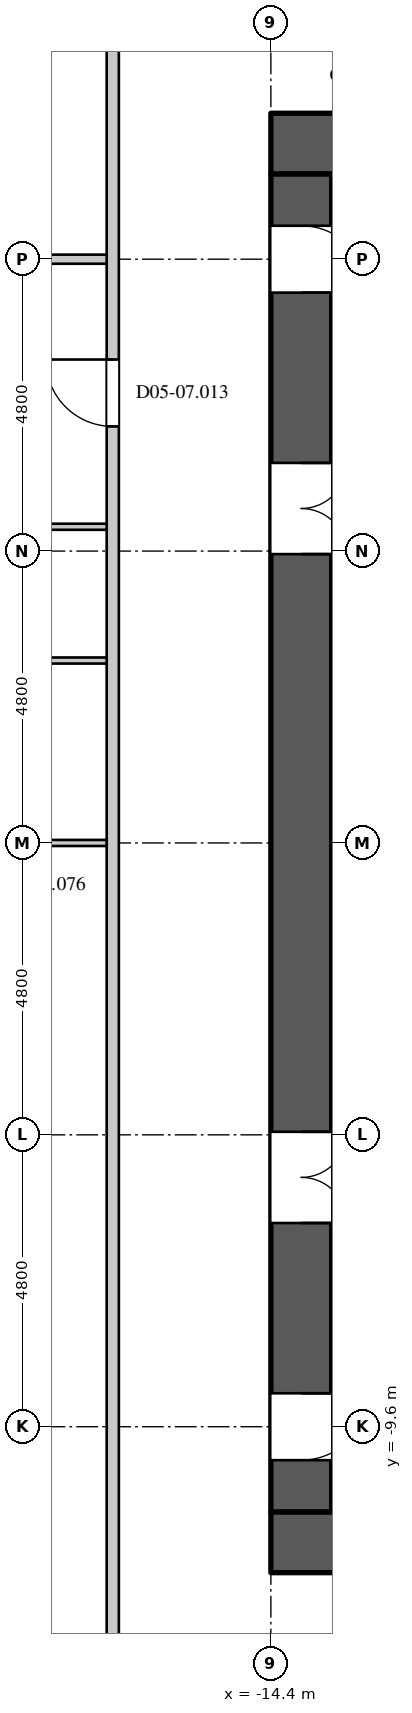
"""IFC4 building model, lengths in metres.
Left out: names, types, materials, properties, quantities, classifications, styles, units other than length and angle.
Written with IfcOpenShell. Run it as: python <this file> out.ifc"""

import sys

from ifc_helpers import new_model, si_unit, direction, frame, frame_2d, origin, place, context, subcontext, project, spatial, rectangle, extrude, element, fill, save


model = new_model("IFC4")
c1 = context("Model", 3, precision=1e-05, world=origin(), true_north=direction((0.0, 1.0)))
c2 = subcontext(c1, "Body", "Model", "MODEL_VIEW")
j1 = project(units=[si_unit("LENGTHUNIT", "METRE"), si_unit("PLANEANGLEUNIT", "RADIAN")], contexts=[c1])
p1 = place(None, origin())
s1 = spatial("IfcSite", under=j1, at=p1, CompositionType="ELEMENT")
p2 = place(p1, origin())
s2 = spatial("IfcBuilding", under=s1, at=p2, CompositionType="ELEMENT")
p3 = place(p2, frame((0.0, 0.0, 25.5)))
s3 = spatial("IfcBuildingStorey", under=s2, at=p3, CompositionType="ELEMENT", Elevation=25.5)
for number, where, z_axis, x_axis in (
    (1, (-14.4, 11.5, 0.0), (0.0, 0.0, 1.0), (1.0, 0.0, 0.0)),
    (2, (-14.4, -11.5, 0.0), (0.0, 0.0, 1.0), (1.0, 0.0, 0.0)),
):
    element("IfcWall", number, at=place(p3, frame(where, z_axis=z_axis, x_axis=x_axis)), inside=s3, PredefinedType="SHEAR", context=c2, shape_type="SweptSolid", body=[
        extrude(rectangle(XDim=28.8, YDim=1.0, at=frame_2d((14.4, 0.0))), origin(), (0.0, 0.0, 1.0), 4.2),
    ])
p4 = place(p3, frame((-13.9, -11.0, 0.0), z_axis=(0.0, 0.0, 1.0), x_axis=(0.0, 1.0, 0.0)))
e3 = element("IfcWall", 3, at=p4, inside=s3, PredefinedType="SHEAR", context=c2, shape_type="SweptSolid", body=[
    extrude(rectangle(XDim=22.0, YDim=1.0, at=frame_2d((11.0, 0.0))), origin(), (0.0, 0.0, 1.0), 4.2),
])
p5 = place(p4, frame((20.05, 0.0, 0.0)))
e4 = element("IfcOpeningElement", 4, at=p5, cuts=e3, PredefinedType="OPENING", context=c2, shape_type="SweptSolid", body=[
    extrude(rectangle(XDim=1.1, YDim=2.2, at=frame_2d((0.55, 1.1))), frame((0.0, 0.51, 0.0), z_axis=(0.0, -1.0, 0.0), x_axis=(1.0, 0.0, 0.0)), (0.0, 0.0, 1.0), 1.02),
])
p6 = place(p4, frame((0.85, 0.0, 0.0)))
e5 = element("IfcOpeningElement", 5, at=p6, cuts=e3, PredefinedType="OPENING", context=c2, shape_type="SweptSolid", body=[
    extrude(rectangle(XDim=1.1, YDim=2.2, at=frame_2d((0.55, 1.1))), frame((0.0, 0.51, 0.0), z_axis=(0.0, -1.0, 0.0), x_axis=(1.0, 0.0, 0.0)), (0.0, 0.0, 1.0), 1.02),
])
p7 = place(p4, frame((15.75, 0.0, 0.0)))
e6 = element("IfcOpeningElement", 6, at=p7, cuts=e3, PredefinedType="OPENING", context=c2, shape_type="SweptSolid", body=[
    extrude(rectangle(XDim=1.5, YDim=2.4, at=frame_2d((0.75, 1.2))), frame((0.0, 0.51, 0.0), z_axis=(0.0, -1.0, 0.0), x_axis=(1.0, 0.0, 0.0)), (0.0, 0.0, 1.0), 1.02),
])
p8 = place(p4, frame((4.75, 0.0, 0.0)))
e7 = element("IfcOpeningElement", 7, at=p8, cuts=e3, PredefinedType="OPENING", context=c2, shape_type="SweptSolid", body=[
    extrude(rectangle(XDim=1.5, YDim=2.4, at=frame_2d((0.75, 1.2))), frame((0.0, 0.51, 0.0), z_axis=(0.0, -1.0, 0.0), x_axis=(1.0, 0.0, 0.0)), (0.0, 0.0, 1.0), 1.02),
])
p9 = place(p3, frame((-17.0, -14.5, 0.0), z_axis=(0.0, 0.0, 1.0), x_axis=(0.0, 1.0, 0.0)))
e8 = element("IfcWall", 8, at=p9, inside=s3, PredefinedType="PARTITIONING", context=c2, shape_type="SweptSolid", body=[
    extrude(rectangle(XDim=29.0, YDim=0.2, at=frame_2d((14.5, 0.0))), origin(), (0.0, 0.0, 1.0), 3.95),
])
p10 = place(p9, frame((21.35, 0.0, 0.0)))
e9 = element("IfcOpeningElement", 9, at=p10, cuts=e8, PredefinedType="OPENING", context=c2, shape_type="SweptSolid", body=[
    extrude(rectangle(XDim=1.1, YDim=2.4, at=frame_2d((0.55, 1.2))), frame((0.0, 0.11, 0.0), z_axis=(0.0, -1.0, 0.0), x_axis=(1.0, 0.0, 0.0)), (0.0, 0.0, 1.0), 0.22),
])
p11 = place(p3, frame((-28.855, 9.6, 0.0), z_axis=(0.0, 0.0, 1.0), x_axis=(1.0, 0.0, 0.0)))
e10 = element("IfcWall", 10, at=p11, inside=s3, PredefinedType="PARTITIONING", context=c2, shape_type="SweptSolid", body=[
    extrude(rectangle(XDim=11.755, YDim=0.15, at=frame_2d((5.877, 0.0))), origin(), (0.0, 0.0, 1.0), 3.95),
])
p12 = place(p11, frame((8.95, 0.0, 0.0)))
e11 = element("IfcOpeningElement", 11, at=p12, cuts=e10, PredefinedType="OPENING", context=c2, shape_type="SweptSolid", body=[
    extrude(rectangle(XDim=0.95, YDim=2.2, at=frame_2d((0.475, 1.1))), frame((0.0, 0.085, 0.0), z_axis=(0.0, -1.0, 0.0), x_axis=(1.0, 0.0, 0.0)), (0.0, 0.0, 1.0), 0.17),
])
p13 = place(p11, frame((2.2, 0.0, 0.0)))
e12 = element("IfcOpeningElement", 12, at=p13, cuts=e10, PredefinedType="OPENING", context=c2, shape_type="SweptSolid", body=[
    extrude(rectangle(XDim=1.5, YDim=2.2, at=frame_2d((0.75, 1.1))), frame((0.0, 0.085, 0.0), z_axis=(0.0, -1.0, 0.0), x_axis=(1.0, 0.0, 0.0)), (0.0, 0.0, 1.0), 0.17),
])
p14 = place(p3, frame((-22.947, -12.051, 0.0), z_axis=(0.0, 0.0, 1.0), x_axis=(0.707106781187, -0.707106781187, 0.0)))
e13 = element("IfcWall", 13, at=p14, inside=s3, PredefinedType="PARTITIONING", context=c2, shape_type="SweptSolid", body=[
    extrude(rectangle(XDim=7.705, YDim=0.15, at=frame_2d((3.853, 0.0))), origin(), (0.0, 0.0, 1.0), 3.95),
])
p15 = place(p14, frame((4.65, 0.0, 0.0)))
e14 = element("IfcOpeningElement", 14, at=p15, cuts=e13, PredefinedType="OPENING", context=c2, shape_type="SweptSolid", body=[
    extrude(rectangle(XDim=0.95, YDim=2.2, at=frame_2d((0.475, 1.1))), frame((0.0, 0.085, 0.0), z_axis=(0.0, -1.0, 0.0), x_axis=(1.0, 0.0, 0.0)), (0.0, 0.0, 1.0), 0.17),
])
p16 = place(p3, frame((-22.947, 12.051, 0.0), z_axis=(0.0, 0.0, 1.0), x_axis=(0.707106781187, 0.707106781187, 0.0)))
e15 = element("IfcWall", 15, at=p16, inside=s3, PredefinedType="PARTITIONING", context=c2, shape_type="SweptSolid", body=[
    extrude(rectangle(XDim=7.705, YDim=0.15, at=frame_2d((3.853, 0.0))), origin(), (0.0, 0.0, 1.0), 3.95),
])
p17 = place(p16, frame((4.75, 0.0, 0.0)))
e16 = element("IfcOpeningElement", 16, at=p17, cuts=e15, PredefinedType="OPENING", context=c2, shape_type="SweptSolid", body=[
    extrude(rectangle(XDim=0.95, YDim=2.2, at=frame_2d((0.475, 1.1))), frame((0.0, 0.085, 0.0), z_axis=(0.0, -1.0, 0.0), x_axis=(1.0, 0.0, 0.0)), (0.0, 0.0, 1.0), 0.17),
])
p18 = place(p3, frame((-21.8, 0.0, 0.0), z_axis=(0.0, 0.0, 1.0), x_axis=(1.0, 0.0, 0.0)))
e17 = element("IfcWall", 17, at=p18, inside=s3, PredefinedType="PARTITIONING", context=c2, shape_type="SweptSolid", body=[
    extrude(rectangle(XDim=4.7, YDim=0.1, at=frame_2d((2.35, 0.0))), origin(), (0.0, 0.0, 1.0), 3.95),
])
p19 = place(p18, frame((1.95, 0.0, 0.0)))
e18 = element("IfcOpeningElement", 18, at=p19, cuts=e17, PredefinedType="OPENING", context=c2, shape_type="SweptSolid", body=[
    extrude(rectangle(XDim=0.9, YDim=2.2, at=frame_2d((0.45, 1.1))), frame((0.0, 0.06, 0.0), z_axis=(0.0, -1.0, 0.0), x_axis=(1.0, 0.0, 0.0)), (0.0, 0.0, 1.0), 0.12),
])
p20 = place(p3, frame((-21.75, 3.0, 0.0), z_axis=(0.0, 0.0, 1.0), x_axis=(1.0, 0.0, 0.0)))
e19 = element("IfcWall", 19, at=p20, inside=s3, PredefinedType="PARTITIONING", context=c2, shape_type="SweptSolid", body=[
    extrude(rectangle(XDim=4.65, YDim=0.1, at=frame_2d((2.325, 0.0))), origin(), (0.0, 0.0, 1.0), 3.95),
])
p21 = place(p3, frame((-21.725, 5.2, 0.0), z_axis=(0.0, 0.0, 1.0), x_axis=(1.0, 0.0, 0.0)))
e20 = element("IfcWall", 20, at=p21, inside=s3, PredefinedType="PARTITIONING", context=c2, shape_type="SweptSolid", body=[
    extrude(rectangle(XDim=4.625, YDim=0.1, at=frame_2d((2.312, 0.0))), origin(), (0.0, 0.0, 1.0), 3.95),
])
p22 = place(p21, frame((1.85, 0.0, 0.0)))
e21 = element("IfcOpeningElement", 21, at=p22, cuts=e20, PredefinedType="OPENING", context=c2, shape_type="SweptSolid", body=[
    extrude(rectangle(XDim=0.9, YDim=2.2, at=frame_2d((0.45, 1.1))), frame((0.0, 0.06, 0.0), z_axis=(0.0, -1.0, 0.0), x_axis=(1.0, 0.0, 0.0)), (0.0, 0.0, 1.0), 0.12),
])
p23 = place(p5, origin())
e22 = element("IfcDoor", 22, at=p23, inside=s3, OperationType="SINGLE_SWING_RIGHT", PredefinedType="DOOR", context=c2, shape_type="SweptSolid", body=[
    extrude(rectangle(XDim=1.1, YDim=2.2, at=frame_2d((0.55, 1.1))), frame((0.0, -0.445, 0.0), z_axis=(0.0, -1.0, 0.0), x_axis=(1.0, 0.0, 0.0)), (0.0, 0.0, 1.0), 0.05),
])
fill(e4, e22)
p24 = place(p6, origin())
e23 = element("IfcDoor", 23, at=p24, inside=s3, OperationType="SINGLE_SWING_LEFT", PredefinedType="DOOR", context=c2, shape_type="SweptSolid", body=[
    extrude(rectangle(XDim=1.1, YDim=2.2, at=frame_2d((0.55, 1.1))), frame((0.0, -0.445, 0.0), z_axis=(0.0, -1.0, 0.0), x_axis=(1.0, 0.0, 0.0)), (0.0, 0.0, 1.0), 0.05),
])
fill(e5, e23)
p25 = place(p7, origin())
e24 = element("IfcDoor", 24, at=p25, inside=s3, OperationType="DOUBLE_DOOR_SINGLE_SWING", PredefinedType="DOOR", context=c2, shape_type="SweptSolid", body=[
    extrude(rectangle(XDim=1.5, YDim=2.4, at=frame_2d((0.75, 1.2))), frame((0.0, -0.445, 0.0), z_axis=(0.0, -1.0, 0.0), x_axis=(1.0, 0.0, 0.0)), (0.0, 0.0, 1.0), 0.05),
])
fill(e6, e24)
p26 = place(p8, origin())
e25 = element("IfcDoor", 25, at=p26, inside=s3, OperationType="DOUBLE_DOOR_SINGLE_SWING", PredefinedType="DOOR", context=c2, shape_type="SweptSolid", body=[
    extrude(rectangle(XDim=1.5, YDim=2.4, at=frame_2d((0.75, 1.2))), frame((0.0, -0.445, 0.0), z_axis=(0.0, -1.0, 0.0), x_axis=(1.0, 0.0, 0.0)), (0.0, 0.0, 1.0), 0.05),
])
fill(e7, e25)
p27 = place(p10, origin())
e26 = element("IfcDoor", 26, at=p27, inside=s3, OperationType="SINGLE_SWING_RIGHT", PredefinedType="DOOR", context=c2, shape_type="SweptSolid", body=[
    extrude(rectangle(XDim=1.1, YDim=2.4, at=frame_2d((0.55, 1.2))), frame((0.0, 0.025, 0.0), z_axis=(0.0, -1.0, 0.0), x_axis=(1.0, 0.0, 0.0)), (0.0, 0.0, 1.0), 0.05),
])
fill(e9, e26)
save(model, sys.argv[1])
